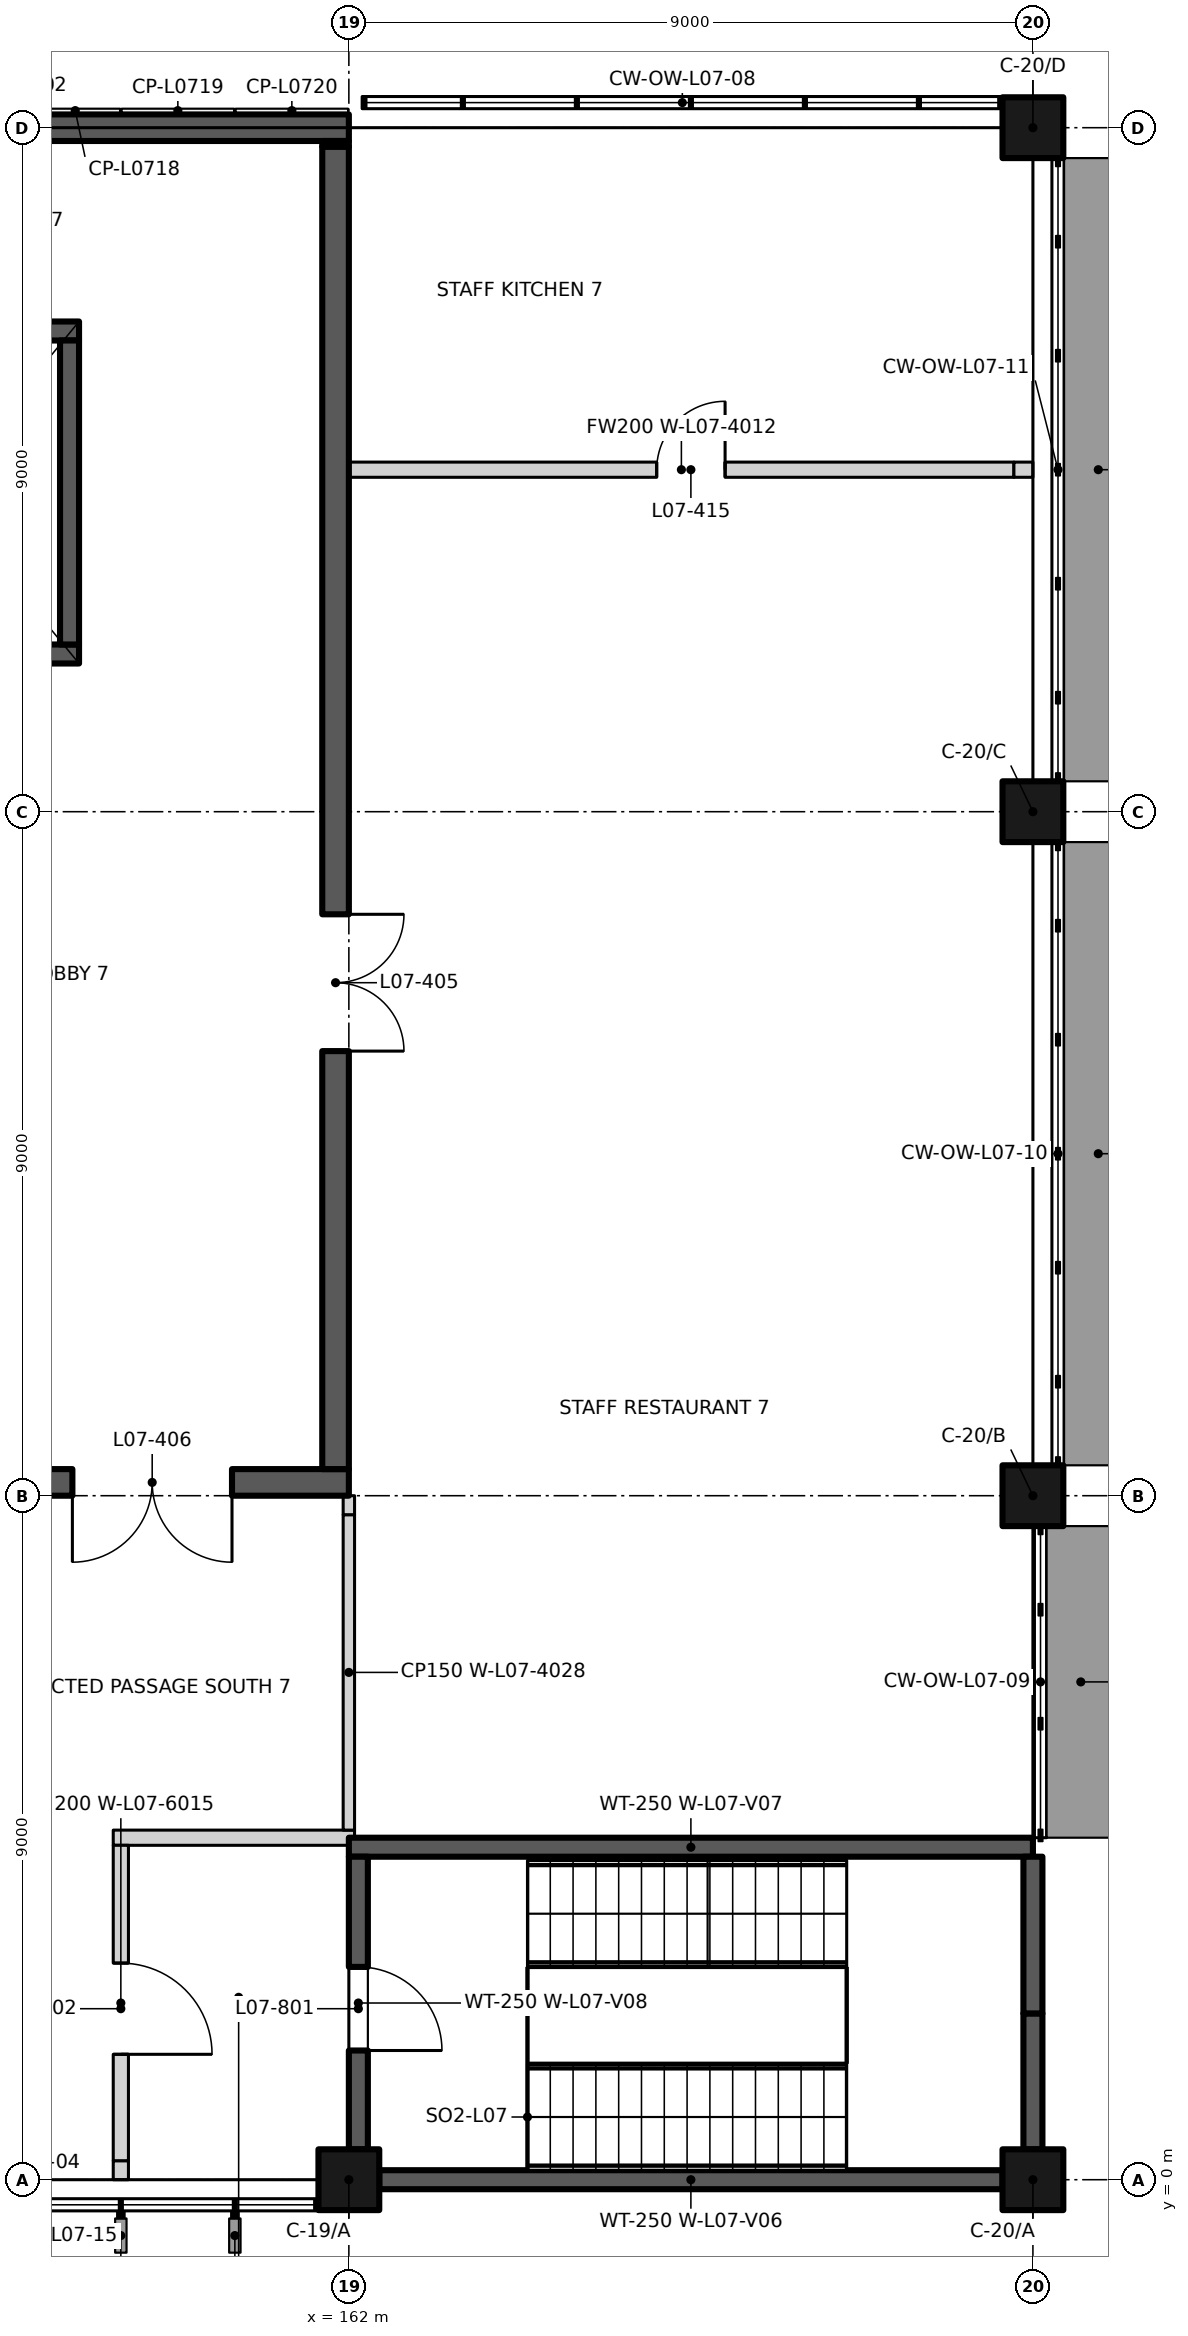
"""IFC4 building model, lengths in metres.
Left out: names, types, materials, properties, quantities, classifications, styles, units other than length and angle.
Written with IfcOpenShell. Run it as: python <this file> out.ifc"""

import sys

from ifc_helpers import new_model, si_unit, direction, frame, frame_2d, origin, origin_2d, place, context, subcontext, project, spatial, rectangle, extrude, element, fill, save


model = new_model("IFC4")
c1 = context("Model", 3, precision=1e-05, world=origin(), true_north=direction((0.0, 1.0)))
c2 = subcontext(c1, "Body", "Model", "MODEL_VIEW")
j1 = project(units=[si_unit("LENGTHUNIT", "METRE"), si_unit("PLANEANGLEUNIT", "RADIAN")], contexts=[c1])
p1 = place(None, origin())
s1 = spatial("IfcSite", under=j1, at=p1, CompositionType="ELEMENT")
p2 = place(p1, origin())
s2 = spatial("IfcBuilding", under=s1, at=p2, CompositionType="ELEMENT")
p3 = place(p2, frame((0.0, 0.0, 33.0)))
s3 = spatial("IfcBuildingStorey", under=s2, at=p3, CompositionType="ELEMENT", Elevation=33.0)
for number, where, z_axis, x_axis in (
    (1, (162.0, 0.0, 0.0), (0.0, 0.0, 1.0), (1.0, 0.0, 0.0)),
    (2, (171.0, 0.0, 0.0), (0.0, 0.0, 1.0), (1.0, 0.0, 0.0)),
    (3, (171.0, 9.0, 0.0), (0.0, 0.0, 1.0), (1.0, 0.0, 0.0)),
    (4, (171.0, 18.0, 0.0), (0.0, 0.0, 1.0), (1.0, 0.0, 0.0)),
    (5, (171.0, 27.0, 0.0), (0.0, 0.0, 1.0), (1.0, 0.0, 0.0)),
):
    element("IfcColumn", number, at=place(p3, frame(where, z_axis=z_axis, x_axis=x_axis)), inside=s3, PredefinedType="COLUMN", context=c2, shape_type="SweptSolid", body=[
        extrude(rectangle(XDim=0.8, YDim=0.8, at=origin_2d()), origin(), (0.0, 0.0, 1.0), 4.5),
    ])
p4 = place(p3, frame((162.4, 0.0, 0.0), z_axis=(0.0, 0.0, 1.0), x_axis=(1.0, 0.0, 0.0)))
e6 = element("IfcWall", 6, at=p4, inside=s3, PredefinedType="SHEAR", context=c2, shape_type="SweptSolid", body=[
    extrude(rectangle(XDim=8.2, YDim=0.25, at=frame_2d((4.1, 0.0))), origin(), (0.0, 0.0, 1.0), 4.5),
])
p5 = place(p3, frame((162.0, 4.375, 0.0), z_axis=(0.0, 0.0, 1.0), x_axis=(1.0, 0.0, 0.0)))
e7 = element("IfcWall", 7, at=p5, inside=s3, PredefinedType="SHEAR", context=c2, shape_type="SweptSolid", body=[
    extrude(rectangle(XDim=9.0, YDim=0.25, at=frame_2d((4.5, 0.0))), origin(), (0.0, 0.0, 1.0), 4.5),
])
p6 = place(p3, frame((162.125, 0.4, 0.0), z_axis=(0.0, 0.0, 1.0), x_axis=(0.0, 1.0, 0.0)))
e8 = element("IfcWall", 8, at=p6, inside=s3, PredefinedType="SHEAR", context=c2, shape_type="SweptSolid", body=[
    extrude(rectangle(XDim=3.85, YDim=0.25, at=frame_2d((1.925, 0.0))), origin(), (0.0, 0.0, 1.0), 4.5),
])
p7 = place(p6, frame((2.4, 0.0, 0.0), z_axis=(0.0, 0.0, 1.0), x_axis=(-1.0, 0.0, 0.0)))
e9 = element("IfcOpeningElement", 9, at=p7, cuts=e8, PredefinedType="OPENING", context=c2, shape_type="SweptSolid", body=[
    extrude(rectangle(XDim=1.1, YDim=2.1, at=frame_2d((0.55, 1.05))), frame((0.0, 0.135, 0.0), z_axis=(0.0, -1.0, 0.0), x_axis=(1.0, 0.0, 0.0)), (0.0, 0.0, 1.0), 0.27),
])
p8 = place(p3, frame((171.0, 0.4, 0.0), z_axis=(0.0, 0.0, 1.0), x_axis=(0.0, 1.0, 0.0)))
e10 = element("IfcWall", 10, at=p8, inside=s3, PredefinedType="SHEAR", context=c2, shape_type="SweptSolid", body=[
    extrude(rectangle(XDim=1.788, YDim=0.25, at=frame_2d((0.894, 0.0))), origin(), (0.0, 0.0, 1.0), 4.5),
])
p9 = place(p3, frame((171.0, 2.188, 0.0), z_axis=(0.0, 0.0, 1.0), x_axis=(0.0, 1.0, 0.0)))
e11 = element("IfcWall", 11, at=p9, inside=s3, PredefinedType="SHEAR", context=c2, shape_type="SweptSolid", body=[
    extrude(rectangle(XDim=2.062, YDim=0.25, at=frame_2d((1.031, 0.0))), origin(), (0.0, 0.0, 1.0), 4.5),
])
p10 = place(p3, frame((154.75, 20.075, 0.0), z_axis=(0.0, 0.0, 1.0), x_axis=(1.0, 0.0, 0.0)))
e12 = element("IfcWall", 12, at=p10, inside=s3, PredefinedType="SHEAR", context=c2, shape_type="SweptSolid", body=[
    extrude(rectangle(XDim=3.7, YDim=0.25, at=frame_2d((1.85, 0.0))), origin(), (0.0, 0.0, 1.0), 4.5),
])
p11 = place(p10, frame((1.15, 0.0, 0.0)))
e13 = element("IfcOpeningElement", 13, at=p11, cuts=e12, PredefinedType="OPENING", context=c2, shape_type="SweptSolid", body=[
    extrude(rectangle(XDim=1.4, YDim=2.1, at=frame_2d((0.7, 1.05))), frame((0.0, 0.135, 0.0), z_axis=(0.0, -1.0, 0.0), x_axis=(1.0, 0.0, 0.0)), (0.0, 0.0, 1.0), 0.27),
])
p12 = place(p3, frame((154.75, 24.325, 0.0), z_axis=(0.0, 0.0, 1.0), x_axis=(1.0, 0.0, 0.0)))
e14 = element("IfcWall", 14, at=p12, inside=s3, PredefinedType="SHEAR", context=c2, shape_type="SweptSolid", body=[
    extrude(rectangle(XDim=3.7, YDim=0.25, at=frame_2d((1.85, 0.0))), origin(), (0.0, 0.0, 1.0), 4.5),
])
p13 = place(p3, frame((158.325, 20.2, 0.0), z_axis=(0.0, 0.0, 1.0), x_axis=(0.0, 1.0, 0.0)))
e15 = element("IfcWall", 15, at=p13, inside=s3, PredefinedType="SHEAR", context=c2, shape_type="SweptSolid", body=[
    extrude(rectangle(XDim=4.0, YDim=0.25, at=frame_2d((2.0, 0.0))), origin(), (0.0, 0.0, 1.0), 4.5),
])
p14 = place(p3, frame((144.0, 27.0, 0.0), z_axis=(0.0, 0.0, 1.0), x_axis=(1.0, 0.0, 0.0)))
e16 = element("IfcWall", 16, at=p14, inside=s3, PredefinedType="SOLIDWALL", context=c2, shape_type="SweptSolid", body=[
    extrude(rectangle(XDim=18.0, YDim=0.35, at=frame_2d((9.0, 0.0))), origin(), (0.0, 0.0, 1.0), 3.6),
])
p15 = place(p14, frame((4.2, 0.0, 0.6)))
e17 = element("IfcOpeningElement", 17, at=p15, cuts=e16, PredefinedType="OPENING", context=c2, shape_type="SweptSolid", body=[
    extrude(rectangle(XDim=0.6, YDim=2.4, at=frame_2d((0.3, 1.2))), frame((0.0, 0.185, 0.0), z_axis=(0.0, -1.0, 0.0), x_axis=(1.0, 0.0, 0.0)), (0.0, 0.0, 1.0), 0.37),
])
p16 = place(p14, frame((13.2, 0.0, 0.6)))
e18 = element("IfcOpeningElement", 18, at=p16, cuts=e16, PredefinedType="OPENING", context=c2, shape_type="SweptSolid", body=[
    extrude(rectangle(XDim=0.6, YDim=2.4, at=frame_2d((0.3, 1.2))), frame((0.0, 0.185, 0.0), z_axis=(0.0, -1.0, 0.0), x_axis=(1.0, 0.0, 0.0)), (0.0, 0.0, 1.0), 0.37),
])
p17 = place(p3, frame((158.9, 4.5, 0.0), z_axis=(0.0, 0.0, 1.0), x_axis=(1.0, 0.0, 0.0)))
e19 = element("IfcWall", 19, at=p17, inside=s3, PredefinedType="PARTITIONING", context=c2, shape_type="SweptSolid", body=[
    extrude(rectangle(XDim=3.175, YDim=0.2, at=frame_2d((1.587, 0.0))), origin(), (0.0, 0.0, 1.0), 4.2),
])
p18 = place(p3, frame((144.0, 9.175, 0.0), z_axis=(0.0, 0.0, 1.0), x_axis=(1.0, 0.0, 0.0)))
e20 = element("IfcWall", 20, at=p18, inside=s3, PredefinedType="SHEAR", context=c2, shape_type="SweptSolid", body=[
    extrude(rectangle(XDim=18.0, YDim=0.35, at=frame_2d((9.0, 0.0))), origin(), (0.0, 0.0, 1.0), 4.2),
])
p19 = place(p18, frame((16.463, 0.0, 0.0), z_axis=(0.0, 0.0, 1.0), x_axis=(-1.0, 0.0, 0.0)))
e21 = element("IfcOpeningElement", 21, at=p19, cuts=e20, PredefinedType="OPENING", context=c2, shape_type="SweptSolid", body=[
    extrude(rectangle(XDim=2.1, YDim=2.4, at=frame_2d((1.05, 1.2))), frame((0.0, 0.185, 0.0), z_axis=(0.0, -1.0, 0.0), x_axis=(1.0, 0.0, 0.0)), (0.0, 0.0, 1.0), 0.37),
])
p20 = place(p3, frame((162.0, 22.5, 0.0), z_axis=(0.0, 0.0, 1.0), x_axis=(1.0, 0.0, 0.0)))
e22 = element("IfcWall", 22, at=p20, inside=s3, PredefinedType="PARTITIONING", context=c2, shape_type="SweptSolid", body=[
    extrude(rectangle(XDim=8.75, YDim=0.2, at=frame_2d((4.375, 0.0))), origin(), (0.0, 0.0, 1.0), 4.2),
])
p21 = place(p20, frame((4.05, 0.0, 0.0)))
e23 = element("IfcOpeningElement", 23, at=p21, cuts=e22, PredefinedType="OPENING", context=c2, shape_type="SweptSolid", body=[
    extrude(rectangle(XDim=0.9, YDim=2.1, at=frame_2d((0.45, 1.05))), frame((0.0, 0.11, 0.0), z_axis=(0.0, -1.0, 0.0), x_axis=(1.0, 0.0, 0.0)), (0.0, 0.0, 1.0), 0.22),
])
for number, where, z_axis, x_axis in (
    (24, (170.75, 22.5, 0.0), (0.0, 0.0, 1.0), (1.0, 0.0, 0.0)),
    (25, (159.0, 0.0, 0.0), (0.0, 0.0, 1.0), (0.0, 1.0, 0.0)),
):
    element("IfcWall", number, at=place(p3, frame(where, z_axis=z_axis, x_axis=x_axis)), inside=s3, PredefinedType="PARTITIONING", context=c2, shape_type="SweptSolid", body=[
        extrude(rectangle(XDim=0.25, YDim=0.2, at=frame_2d((0.125, 0.0))), origin(), (0.0, 0.0, 1.0), 3.6),
    ])
p22 = place(p3, frame((159.0, 0.25, 0.0), z_axis=(0.0, 0.0, 1.0), x_axis=(0.0, 1.0, 0.0)))
e26 = element("IfcWall", 26, at=p22, inside=s3, PredefinedType="PARTITIONING", context=c2, shape_type="SweptSolid", body=[
    extrude(rectangle(XDim=4.15, YDim=0.2, at=frame_2d((2.075, 0.0))), origin(), (0.0, 0.0, 1.0), 4.2),
])
p23 = place(p22, frame((2.6, 0.0, 0.0), z_axis=(0.0, 0.0, 1.0), x_axis=(-1.0, 0.0, 0.0)))
e27 = element("IfcOpeningElement", 27, at=p23, cuts=e26, PredefinedType="OPENING", context=c2, shape_type="SweptSolid", body=[
    extrude(rectangle(XDim=1.2, YDim=2.1, at=frame_2d((0.6, 1.05))), frame((0.0, 0.11, 0.0), z_axis=(0.0, -1.0, 0.0), x_axis=(1.0, 0.0, 0.0)), (0.0, 0.0, 1.0), 0.22),
])
p24 = place(p3, frame((161.825, 9.35, 0.0), z_axis=(0.0, 0.0, 1.0), x_axis=(0.0, 1.0, 0.0)))
e28 = element("IfcWall", 28, at=p24, inside=s3, PredefinedType="SHEAR", context=c2, shape_type="SweptSolid", body=[
    extrude(rectangle(XDim=17.4, YDim=0.35, at=frame_2d((8.7, 0.0))), origin(), (0.0, 0.0, 1.0), 4.2),
])
p25 = place(p24, frame((7.3, 0.0, 0.0), z_axis=(0.0, 0.0, 1.0), x_axis=(-1.0, 0.0, 0.0)))
e29 = element("IfcOpeningElement", 29, at=p25, cuts=e28, PredefinedType="OPENING", context=c2, shape_type="SweptSolid", body=[
    extrude(rectangle(XDim=1.8, YDim=2.4, at=frame_2d((0.9, 1.2))), frame((0.0, 0.185, 0.0), z_axis=(0.0, -1.0, 0.0), x_axis=(1.0, 0.0, 0.0)), (0.0, 0.0, 1.0), 0.37),
])
p26 = place(p3, frame((161.825, 26.75, 0.0), z_axis=(0.0, 0.0, 1.0), x_axis=(0.0, 1.0, 0.0)))
e30 = element("IfcWall", 30, at=p26, inside=s3, PredefinedType="SHEAR", context=c2, shape_type="SweptSolid", body=[
    extrude(rectangle(XDim=0.075, YDim=0.35, at=frame_2d((0.038, 0.0))), origin(), (0.0, 0.0, 1.0), 3.6),
])
p27 = place(p3, frame((162.0, 4.6, 0.0), z_axis=(0.0, 0.0, 1.0), x_axis=(0.0, 1.0, 0.0)))
e31 = element("IfcWall", 31, at=p27, inside=s3, PredefinedType="PARTITIONING", context=c2, shape_type="SweptSolid", body=[
    extrude(rectangle(XDim=4.15, YDim=0.15, at=frame_2d((2.075, 0.0))), origin(), (0.0, 0.0, 1.0), 4.2),
])
p28 = place(p3, frame((162.0, 8.75, 0.0), z_axis=(0.0, 0.0, 1.0), x_axis=(0.0, 1.0, 0.0)))
e32 = element("IfcWall", 32, at=p28, inside=s3, PredefinedType="PARTITIONING", context=c2, shape_type="SweptSolid", body=[
    extrude(rectangle(XDim=0.25, YDim=0.15, at=frame_2d((0.125, 0.0))), origin(), (0.0, 0.0, 1.0), 3.6),
])
p29 = place(p7, origin())
e33 = element("IfcDoor", 33, at=p29, inside=s3, OperationType="SINGLE_SWING_RIGHT", PredefinedType="DOOR", context=c2, shape_type="SweptSolid", body=[
    extrude(rectangle(XDim=1.1, YDim=2.1, at=frame_2d((0.55, 1.05))), frame((0.0, 0.025, 0.0), z_axis=(0.0, -1.0, 0.0), x_axis=(1.0, 0.0, 0.0)), (0.0, 0.0, 1.0), 0.05),
])
fill(e9, e33)
p30 = place(p23, origin())
e34 = element("IfcDoor", 34, at=p30, inside=s3, OperationType="SINGLE_SWING_RIGHT", PredefinedType="DOOR", context=c2, shape_type="SweptSolid", body=[
    extrude(rectangle(XDim=1.2, YDim=2.1, at=frame_2d((0.6, 1.05))), frame((0.0, 0.025, 0.0), z_axis=(0.0, -1.0, 0.0), x_axis=(1.0, 0.0, 0.0)), (0.0, 0.0, 1.0), 0.05),
])
fill(e27, e34)
p31 = place(p25, origin())
e35 = element("IfcDoor", 35, at=p31, inside=s3, OperationType="DOUBLE_DOOR_SINGLE_SWING", PredefinedType="DOOR", context=c2, shape_type="SweptSolid", body=[
    extrude(rectangle(XDim=1.8, YDim=2.4, at=frame_2d((0.9, 1.2))), frame((0.0, 0.025, 0.0), z_axis=(0.0, -1.0, 0.0), x_axis=(1.0, 0.0, 0.0)), (0.0, 0.0, 1.0), 0.05),
])
fill(e29, e35)
p32 = place(p19, origin())
e36 = element("IfcDoor", 36, at=p32, inside=s3, OperationType="DOUBLE_DOOR_SINGLE_SWING", PredefinedType="DOOR", context=c2, shape_type="SweptSolid", body=[
    extrude(rectangle(XDim=2.1, YDim=2.4, at=frame_2d((1.05, 1.2))), frame((0.0, 0.025, 0.0), z_axis=(0.0, -1.0, 0.0), x_axis=(1.0, 0.0, 0.0)), (0.0, 0.0, 1.0), 0.05),
])
fill(e21, e36)
p33 = place(p21, origin())
e37 = element("IfcDoor", 37, at=p33, inside=s3, OperationType="SINGLE_SWING_RIGHT", PredefinedType="DOOR", context=c2, shape_type="SweptSolid", body=[
    extrude(rectangle(XDim=0.9, YDim=2.1, at=frame_2d((0.45, 1.05))), frame((0.0, 0.025, 0.0), z_axis=(0.0, -1.0, 0.0), x_axis=(1.0, 0.0, 0.0)), (0.0, 0.0, 1.0), 0.05),
])
fill(e23, e37)
save(model, sys.argv[1])
